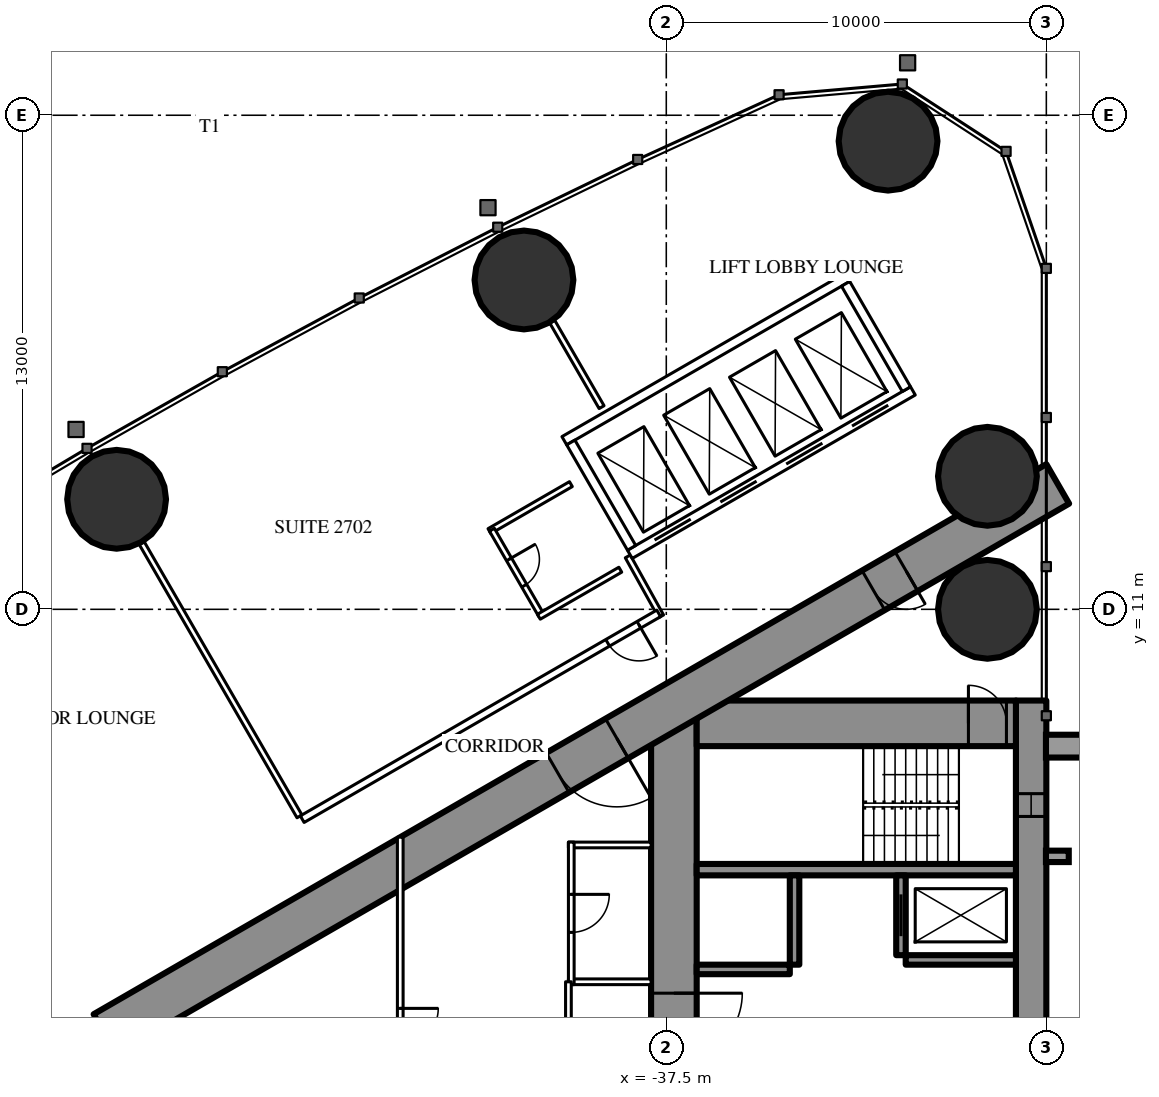
"""IFC4 building model, lengths in metres.
Left out: names, types, materials, properties, quantities, classifications, styles, units other than length and angle.
Written with IfcOpenShell. Run it as: python <this file> out.ifc"""

import sys

from ifc_helpers import new_model, si_unit, direction, frame, frame_2d, origin, origin_2d, place, context, subcontext, project, spatial, rectangle, hollow_circle, extrude, element, fill, save


model = new_model("IFC4")
c1 = context("Model", 3, precision=1e-05, world=origin(), true_north=direction((0.0, 1.0)))
c2 = subcontext(c1, "Body", "Model", "MODEL_VIEW")
j1 = project(units=[si_unit("LENGTHUNIT", "METRE"), si_unit("PLANEANGLEUNIT", "RADIAN")], contexts=[c1])
p1 = place(None, origin())
s1 = spatial("IfcSite", under=j1, at=p1, CompositionType="ELEMENT")
p2 = place(p1, origin())
s2 = spatial("IfcBuilding", under=s1, at=p2, CompositionType="ELEMENT")
p3 = place(p2, frame((0.0, 0.0, 104.6)))
s3 = spatial("IfcBuildingStorey", under=s2, at=p3, CompositionType="ELEMENT", Elevation=104.6)
for number, where, z_axis, x_axis in (
    (1, (-31.665, 23.318, 0.0), (0.0, 0.0, 1.0), (1.0, 0.0, 0.0)),
    (2, (-29.05, 11.0, 0.0), (0.0, 0.0, 1.0), (1.0, 0.0, 0.0)),
    (3, (-29.05, 14.5, 0.0), (0.0, 0.0, 1.0), (1.0, 0.0, 0.0)),
    (4, (-41.245, 19.666, 0.0), (0.0, 0.0, 1.0), (1.0, 0.0, 0.0)),
    (5, (-51.963, 13.895, 0.0), (0.0, 0.0, 1.0), (1.0, 0.0, 0.0)),
):
    element("IfcColumn", number, at=place(p3, frame(where, z_axis=z_axis, x_axis=x_axis)), inside=s3, PredefinedType="COLUMN", context=c2, shape_type="SweptSolid", body=[
        extrude(hollow_circle(Radius=1.3, WallThickness=0.1, at=origin_2d()), origin(), (0.0, 0.0, 1.0), 3.5),
    ])
p4 = place(p3, frame((-27.9, 8.6, 0.0), z_axis=(0.0, 0.0, 1.0), x_axis=(0.0, -1.0, 0.0)))
e6 = element("IfcWall", 6, at=p4, inside=s3, PredefinedType="SHEAR", context=c2, shape_type="SweptSolid", body=[
    extrude(rectangle(XDim=17.2, YDim=0.8, at=frame_2d((8.6, 0.0))), origin(), (0.0, 0.0, 1.0), 3.5),
])
p5 = place(p4, frame((2.45, 0.0, 0.6)))
e7 = element("IfcOpeningElement", 7, at=p5, cuts=e6, PredefinedType="OPENING", context=c2, shape_type="SweptSolid", body=[
    extrude(rectangle(XDim=0.6, YDim=2.1, at=frame_2d((0.3, 1.05))), frame((0.0, 0.41, 0.0), z_axis=(0.0, -1.0, 0.0), x_axis=(1.0, 0.0, 0.0)), (0.0, 0.0, 1.0), 0.82),
])
p6 = place(p4, frame((14.15, 0.0, 0.6)))
e8 = element("IfcOpeningElement", 8, at=p6, cuts=e6, PredefinedType="OPENING", context=c2, shape_type="SweptSolid", body=[
    extrude(rectangle(XDim=0.6, YDim=2.1, at=frame_2d((0.3, 1.05))), frame((0.0, 0.41, 0.0), z_axis=(0.0, -1.0, 0.0), x_axis=(1.0, 0.0, 0.0)), (0.0, 0.0, 1.0), 0.82),
])
p7 = place(p3, frame((-37.3, 8.6, 0.0), z_axis=(0.0, 0.0, 1.0), x_axis=(0.0, -1.0, 0.0)))
e9 = element("IfcWall", 9, at=p7, inside=s3, PredefinedType="SHEAR", context=c2, shape_type="SweptSolid", body=[
    extrude(rectangle(XDim=17.2, YDim=1.2, at=frame_2d((8.6, 0.0))), origin(), (0.0, 0.0, 1.0), 3.5),
])
p8 = place(p7, frame((7.7, 0.0, 0.0)))
e10 = element("IfcOpeningElement", 10, at=p8, cuts=e9, PredefinedType="OPENING", context=c2, shape_type="SweptSolid", body=[
    extrude(rectangle(XDim=1.8, YDim=2.2, at=frame_2d((0.9, 1.1))), frame((0.0, 0.61, 0.0), z_axis=(0.0, -1.0, 0.0), x_axis=(1.0, 0.0, 0.0)), (0.0, 0.0, 1.0), 1.22),
])
p9 = place(p3, frame((-28.3, 8.0, 0.0), z_axis=(0.0, 0.0, 1.0), x_axis=(-1.0, 0.0, 0.0)))
e11 = element("IfcWall", 11, at=p9, inside=s3, PredefinedType="SHEAR", context=c2, shape_type="SweptSolid", body=[
    extrude(rectangle(XDim=8.4, YDim=1.2, at=frame_2d((4.2, 0.0))), origin(), (0.0, 0.0, 1.0), 3.5),
])
p10 = place(p9, frame((0.25, 0.0, 0.0)))
e12 = element("IfcOpeningElement", 12, at=p10, cuts=e11, PredefinedType="OPENING", context=c2, shape_type="SweptSolid", body=[
    extrude(rectangle(XDim=1.0, YDim=2.2, at=frame_2d((0.5, 1.1))), frame((0.0, 0.61, 0.0), z_axis=(0.0, -1.0, 0.0), x_axis=(1.0, 0.0, 0.0)), (0.0, 0.0, 1.0), 1.22),
])
p11 = place(p3, frame((-28.3, 4.15, 0.0), z_axis=(0.0, 0.0, 1.0), x_axis=(-1.0, 0.0, 0.0)))
e13 = element("IfcWall", 13, at=p11, inside=s3, PredefinedType="SHEAR", context=c2, shape_type="SweptSolid", body=[
    extrude(rectangle(XDim=8.4, YDim=0.3, at=frame_2d((4.2, 0.0))), origin(), (0.0, 0.0, 1.0), 3.5),
])
p12 = place(p3, frame((-31.325, 4.0, 0.0), z_axis=(0.0, 0.0, 1.0), x_axis=(0.0, -1.0, 0.0)))
e14 = element("IfcWall", 14, at=p12, inside=s3, PredefinedType="SHEAR", context=c2, shape_type="SweptSolid", body=[
    extrude(rectangle(XDim=2.1, YDim=0.25, at=frame_2d((1.05, 0.0))), origin(), (0.0, 0.0, 1.0), 3.5),
])
p13 = place(p12, frame((0.5, 0.0, 0.0)))
e15 = element("IfcOpeningElement", 15, at=p13, cuts=e14, PredefinedType="OPENING", context=c2, shape_type="SweptSolid", body=[
    extrude(rectangle(XDim=1.1, YDim=2.2, at=frame_2d((0.55, 1.1))), frame((0.0, 0.135, 0.0), z_axis=(0.0, -1.0, 0.0), x_axis=(1.0, 0.0, 0.0)), (0.0, 0.0, 1.0), 0.27),
])
p14 = place(p3, frame((-34.125, 4.0, 0.0), z_axis=(0.0, 0.0, 1.0), x_axis=(0.0, -1.0, 0.0)))
e16 = element("IfcWall", 16, at=p14, inside=s3, PredefinedType="SHEAR", context=c2, shape_type="SweptSolid", body=[
    extrude(rectangle(XDim=2.35, YDim=0.25, at=frame_2d((1.175, 0.0))), origin(), (0.0, 0.0, 1.0), 3.5),
])
p15 = place(p3, frame((-28.3, 1.775, 0.0), z_axis=(0.0, 0.0, 1.0), x_axis=(-1.0, 0.0, 0.0)))
e17 = element("IfcWall", 17, at=p15, inside=s3, PredefinedType="SHEAR", context=c2, shape_type="SweptSolid", body=[
    extrude(rectangle(XDim=2.9, YDim=0.25, at=frame_2d((1.45, 0.0))), origin(), (0.0, 0.0, 1.0), 3.5),
])
p16 = place(p3, frame((-34.25, 1.525, 0.0), z_axis=(0.0, 0.0, 1.0), x_axis=(-1.0, 0.0, 0.0)))
e18 = element("IfcWall", 18, at=p16, inside=s3, PredefinedType="SHEAR", context=c2, shape_type="SweptSolid", body=[
    extrude(rectangle(XDim=2.45, YDim=0.25, at=frame_2d((1.225, 0.0))), origin(), (0.0, 0.0, 1.0), 3.5),
])
p17 = place(p3, frame((-27.2, 14.3, 0.0), z_axis=(0.0, 0.0, 1.0), x_axis=(-0.866026593062, -0.499997940104, 0.0)))
e19 = element("IfcWall", 19, at=p17, inside=s3, PredefinedType="SHEAR", context=c2, shape_type="SweptSolid", body=[
    extrude(rectangle(XDim=28.946, YDim=1.2, at=frame_2d((14.473, 0.0))), origin(), (0.0, 0.0, 1.0), 3.5),
])
p18 = place(p17, frame((4.6, 0.0, 0.0)))
e20 = element("IfcOpeningElement", 20, at=p18, cuts=e19, PredefinedType="OPENING", context=c2, shape_type="SweptSolid", body=[
    extrude(rectangle(XDim=1.0, YDim=2.2, at=frame_2d((0.5, 1.1))), frame((0.0, 0.61, 0.0), z_axis=(0.0, -1.0, 0.0), x_axis=(1.0, 0.0, 0.0)), (0.0, 0.0, 1.0), 1.22),
])
p19 = place(p17, frame((13.395, 0.0, 0.0)))
e21 = element("IfcOpeningElement", 21, at=p19, cuts=e19, PredefinedType="OPENING", context=c2, shape_type="SweptSolid", body=[
    extrude(rectangle(XDim=1.8, YDim=2.2, at=frame_2d((0.9, 1.1))), frame((0.0, 0.61, 0.0), z_axis=(0.0, -1.0, 0.0), x_axis=(1.0, 0.0, 0.0)), (0.0, 0.0, 1.0), 1.22),
])
p20 = place(p3, frame((-47.151, 5.552, 0.0), z_axis=(0.0, 0.0, 1.0), x_axis=(-0.500003012045, 0.866023664773, 0.0)))
e22 = element("IfcWall", 22, at=p20, inside=s3, PredefinedType="PARTITIONING", context=c2, shape_type="SweptSolid", body=[
    extrude(rectangle(XDim=8.311, YDim=0.15, at=frame_2d((4.156, 0.0))), origin(), (0.0, 0.0, 1.0), 2.2),
])
p21 = place(p3, frame((-39.202, 16.32, 0.0), z_axis=(0.0, 0.0, 1.0), x_axis=(-0.499947391036, 0.866055775454, 0.0)))
e23 = element("IfcWall", 23, at=p21, inside=s3, PredefinedType="PARTITIONING", context=c2, shape_type="SweptSolid", body=[
    extrude(rectangle(XDim=2.599, YDim=0.15, at=frame_2d((1.3, 0.0))), origin(), (0.0, 0.0, 1.0), 3.25),
])
p22 = place(p3, frame((-38.513, 12.392, 0.0), z_axis=(0.0, 0.0, 1.0), x_axis=(0.485585508183, -0.874189175317, 0.0)))
e24 = element("IfcWall", 24, at=p22, inside=s3, PredefinedType="PARTITIONING", context=c2, shape_type="SweptSolid", body=[
    extrude(rectangle(XDim=1.805, YDim=0.15, at=frame_2d((0.902, 0.0))), origin(), (0.0, 0.0, 1.0), 3.25),
])
p23 = place(p3, frame((-37.7, 10.894, 0.0), z_axis=(0.0, 0.0, 1.0), x_axis=(-0.866027551079, -0.499996280759, 0.0)))
e25 = element("IfcWall", 25, at=p23, inside=s3, PredefinedType="PARTITIONING", context=c2, shape_type="SweptSolid", body=[
    extrude(rectangle(XDim=10.831, YDim=0.2, at=frame_2d((5.415, 0.0))), origin(), (0.0, 0.0, 1.0), 3.25),
])
p24 = place(p23, frame((0.6, 0.0, 0.0)))
e26 = element("IfcOpeningElement", 26, at=p24, cuts=e25, PredefinedType="OPENING", context=c2, shape_type="SweptSolid", body=[
    extrude(rectangle(XDim=0.95, YDim=2.2, at=frame_2d((0.475, 1.1))), frame((0.0, 0.11, 0.0), z_axis=(0.0, -1.0, 0.0), x_axis=(1.0, 0.0, 0.0)), (0.0, 0.0, 1.0), 0.22),
])
p25 = place(p3, frame((-40.01, 14.294, 0.0), z_axis=(0.0, 0.0, 1.0), x_axis=(-0.866031185235, -0.4999899861, 0.0)))
e27 = element("IfcWall", 27, at=p25, inside=s3, PredefinedType="PARTITIONING", context=c2, shape_type="SweptSolid", body=[
    extrude(rectangle(XDim=2.475, YDim=0.15, at=frame_2d((1.238, 0.0))), origin(), (0.0, 0.0, 1.0), 3.25),
])
p26 = place(p3, frame((-40.788, 10.843, 0.0), z_axis=(0.0, 0.0, 1.0), x_axis=(-0.500006934395, 0.866021400173, 0.0)))
e28 = element("IfcWall", 28, at=p26, inside=s3, PredefinedType="PARTITIONING", context=c2, shape_type="SweptSolid", body=[
    extrude(rectangle(XDim=2.6, YDim=0.15, at=frame_2d((1.3, 0.0))), origin(), (0.0, 0.0, 1.0), 3.25),
])
p27 = place(p26, frame((0.9, 0.0, 0.0)))
e29 = element("IfcOpeningElement", 29, at=p27, cuts=e28, PredefinedType="OPENING", context=c2, shape_type="SweptSolid", body=[
    extrude(rectangle(XDim=0.8, YDim=2.2, at=frame_2d((0.4, 1.1))), frame((0.0, 0.085, 0.0), z_axis=(0.0, -1.0, 0.0), x_axis=(1.0, 0.0, 0.0)), (0.0, 0.0, 1.0), 0.17),
])
p28 = place(p3, frame((-38.71, 12.042, 0.0), z_axis=(0.0, 0.0, 1.0), x_axis=(-0.86604923931, -0.499958713387, 0.0)))
e30 = element("IfcWall", 30, at=p28, inside=s3, PredefinedType="PARTITIONING", context=c2, shape_type="SweptSolid", body=[
    extrude(rectangle(XDim=2.475, YDim=0.15, at=frame_2d((1.237, 0.0))), origin(), (0.0, 0.0, 1.0), 3.25),
])
for number, where, z_axis, x_axis in (
    (31, (-37.9, 1.2, 0.0), (0.0, 0.0, 1.0), (-1.0, 0.0, 0.0)),
    (32, (-37.9, 4.8, 0.0), (0.0, 0.0, 1.0), (-1.0, 0.0, 0.0)),
):
    element("IfcWall", number, at=place(p3, frame(where, z_axis=z_axis, x_axis=x_axis)), inside=s3, PredefinedType="PARTITIONING", context=c2, shape_type="SweptSolid", body=[
        extrude(rectangle(XDim=2.175, YDim=0.15, at=frame_2d((1.087, 0.0))), origin(), (0.0, 0.0, 1.0), 3.25),
    ])
p29 = place(p3, frame((-40.0, 4.875, 0.0), z_axis=(0.0, 0.0, 1.0), x_axis=(0.0, -1.0, 0.0)))
e33 = element("IfcWall", 33, at=p29, inside=s3, PredefinedType="PARTITIONING", context=c2, shape_type="SweptSolid", body=[
    extrude(rectangle(XDim=3.75, YDim=0.15, at=frame_2d((1.875, 0.0))), origin(), (0.0, 0.0, 1.0), 3.25),
])
p30 = place(p29, frame((1.375, 0.0, 0.0)))
e34 = element("IfcOpeningElement", 34, at=p30, cuts=e33, PredefinedType="OPENING", context=c2, shape_type="SweptSolid", body=[
    extrude(rectangle(XDim=1.0, YDim=2.2, at=frame_2d((0.5, 1.1))), frame((0.0, 0.085, 0.0), z_axis=(0.0, -1.0, 0.0), x_axis=(1.0, 0.0, 0.0)), (0.0, 0.0, 1.0), 0.17),
])
p31 = place(p3, frame((-40.075, 1.2, 0.0), z_axis=(0.0, 0.0, 1.0), x_axis=(0.0, -1.0, 0.0)))
e35 = element("IfcWall", 35, at=p31, inside=s3, PredefinedType="PARTITIONING", context=c2, shape_type="SweptSolid", body=[
    extrude(rectangle(XDim=7.374, YDim=0.15, at=frame_2d((3.687, 0.0))), origin(), (0.0, 0.0, 1.0), 3.25),
])
p32 = place(p31, frame((2.787, 0.0, 0.0)))
e36 = element("IfcOpeningElement", 36, at=p32, cuts=e35, PredefinedType="OPENING", context=c2, shape_type="SweptSolid", body=[
    extrude(rectangle(XDim=1.8, YDim=2.2, at=frame_2d((0.9, 1.1))), frame((0.0, 0.085, 0.0), z_axis=(0.0, -1.0, 0.0), x_axis=(1.0, 0.0, 0.0)), (0.0, 0.0, 1.0), 0.17),
])
p33 = place(p3, frame((-44.5, 5.005, 0.0), z_axis=(0.0, 0.0, 1.0), x_axis=(0.0, -1.0, 0.0)))
e37 = element("IfcWall", 37, at=p33, inside=s3, PredefinedType="PARTITIONING", context=c2, shape_type="SweptSolid", body=[
    extrude(rectangle(XDim=10.009, YDim=0.15, at=frame_2d((5.005, 0.0))), origin(), (0.0, 0.0, 1.0), 2.45),
])
p34 = place(p33, frame((4.505, 0.0, 0.0)))
e38 = element("IfcOpeningElement", 38, at=p34, cuts=e37, PredefinedType="OPENING", context=c2, shape_type="SweptSolid", body=[
    extrude(rectangle(XDim=1.0, YDim=2.2, at=frame_2d((0.5, 1.1))), frame((0.0, 0.085, 0.0), z_axis=(0.0, -1.0, 0.0), x_axis=(1.0, 0.0, 0.0)), (0.0, 0.0, 1.0), 0.17),
])
p35 = place(p3, frame((-31.01, 16.747, 0.0), z_axis=(0.0, 0.0, 1.0), x_axis=(-0.866028165386, -0.499995216735, 0.0)))
e39 = element("IfcWall", 39, at=p35, inside=s3, PredefinedType="PARTITIONING", context=c2, shape_type="SweptSolid", body=[
    extrude(rectangle(XDim=8.6, YDim=0.25, at=frame_2d((4.3, 0.0))), origin(), (0.0, 0.0, 1.0), 3.25),
])
p36 = place(p35, frame((0.75, 0.0, 0.0)))
e40 = element("IfcOpeningElement", 40, at=p36, cuts=e39, PredefinedType="OPENING", context=c2, shape_type="SweptSolid", body=[
    extrude(rectangle(XDim=1.1, YDim=2.2, at=frame_2d((0.55, 1.1))), frame((0.0, 0.135, 0.0), z_axis=(0.0, -1.0, 0.0), x_axis=(1.0, 0.0, 0.0)), (0.0, 0.0, 1.0), 0.27),
])
p37 = place(p35, frame((2.75, 0.0, 0.0)))
e41 = element("IfcOpeningElement", 41, at=p37, cuts=e39, PredefinedType="OPENING", context=c2, shape_type="SweptSolid", body=[
    extrude(rectangle(XDim=1.1, YDim=2.2, at=frame_2d((0.55, 1.1))), frame((0.0, 0.135, 0.0), z_axis=(0.0, -1.0, 0.0), x_axis=(1.0, 0.0, 0.0)), (0.0, 0.0, 1.0), 0.27),
])
p38 = place(p35, frame((4.75, 0.0, 0.0)))
e42 = element("IfcOpeningElement", 42, at=p38, cuts=e39, PredefinedType="OPENING", context=c2, shape_type="SweptSolid", body=[
    extrude(rectangle(XDim=1.1, YDim=2.2, at=frame_2d((0.55, 1.1))), frame((0.0, 0.135, 0.0), z_axis=(0.0, -1.0, 0.0), x_axis=(1.0, 0.0, 0.0)), (0.0, 0.0, 1.0), 0.27),
])
p39 = place(p35, frame((6.75, 0.0, 0.0)))
e43 = element("IfcOpeningElement", 43, at=p39, cuts=e39, PredefinedType="OPENING", context=c2, shape_type="SweptSolid", body=[
    extrude(rectangle(XDim=1.1, YDim=2.2, at=frame_2d((0.55, 1.1))), frame((0.0, 0.135, 0.0), z_axis=(0.0, -1.0, 0.0), x_axis=(1.0, 0.0, 0.0)), (0.0, 0.0, 1.0), 0.27),
])
p40 = place(p3, frame((-32.736, 19.736, 0.0), z_axis=(0.0, 0.0, 1.0), x_axis=(-0.866028165386, -0.499995216735, 0.0)))
e44 = element("IfcWall", 44, at=p40, inside=s3, PredefinedType="PARTITIONING", context=c2, shape_type="SweptSolid", body=[
    extrude(rectangle(XDim=8.6, YDim=0.25, at=frame_2d((4.3, 0.0))), origin(), (0.0, 0.0, 1.0), 3.25),
])
p41 = place(p3, frame((-31.181, 16.793, 0.0), z_axis=(0.0, 0.0, 1.0), x_axis=(-0.499929347863, 0.866066190972, 0.0)))
e45 = element("IfcWall", 45, at=p41, inside=s3, PredefinedType="PARTITIONING", context=c2, shape_type="SweptSolid", body=[
    extrude(rectangle(XDim=3.201, YDim=0.25, at=frame_2d((1.6, 0.0))), origin(), (0.0, 0.0, 1.0), 3.25),
])
p42 = place(p3, frame((-38.413, 12.618, 0.0), z_axis=(0.0, 0.0, 1.0), x_axis=(-0.499872130319, 0.866099216793, 0.0)))
e46 = element("IfcWall", 46, at=p42, inside=s3, PredefinedType="PARTITIONING", context=c2, shape_type="SweptSolid", body=[
    extrude(rectangle(XDim=3.2, YDim=0.25, at=frame_2d((1.6, 0.0))), origin(), (0.0, 0.0, 1.0), 3.25),
])
p43 = place(p27, origin())
e47 = element("IfcDoor", 47, at=p43, inside=s3, OperationType="SINGLE_SWING_RIGHT", PredefinedType="DOOR", context=c2, shape_type="SweptSolid", body=[
    extrude(rectangle(XDim=0.8, YDim=2.2, at=frame_2d((0.4, 1.1))), frame((0.0, 0.025, 0.0), z_axis=(0.0, -1.0, 0.0), x_axis=(1.0, 0.0, 0.0)), (0.0, 0.0, 1.0), 0.05),
])
fill(e29, e47)
p44 = place(p24, origin())
e48 = element("IfcDoor", 48, at=p44, inside=s3, OperationType="SINGLE_SWING_LEFT", PredefinedType="DOOR", context=c2, shape_type="SweptSolid", body=[
    extrude(rectangle(XDim=0.95, YDim=2.2, at=frame_2d((0.475, 1.1))), frame((0.0, 0.025, 0.0), z_axis=(0.0, -1.0, 0.0), x_axis=(1.0, 0.0, 0.0)), (0.0, 0.0, 1.0), 0.05),
])
fill(e26, e48)
p45 = place(p30, origin())
e49 = element("IfcDoor", 49, at=p45, inside=s3, OperationType="SINGLE_SWING_LEFT", PredefinedType="DOOR", context=c2, shape_type="SweptSolid", body=[
    extrude(rectangle(XDim=1.0, YDim=2.2, at=frame_2d((0.5, 1.1))), frame((0.0, 0.025, 0.0), z_axis=(0.0, -1.0, 0.0), x_axis=(1.0, 0.0, 0.0)), (0.0, 0.0, 1.0), 0.05),
])
fill(e34, e49)
p46 = place(p34, origin())
e50 = element("IfcDoor", 50, at=p46, inside=s3, OperationType="SINGLE_SWING_LEFT", PredefinedType="DOOR", context=c2, shape_type="SweptSolid", body=[
    extrude(rectangle(XDim=1.0, YDim=2.2, at=frame_2d((0.5, 1.1))), frame((0.0, 0.025, 0.0), z_axis=(0.0, -1.0, 0.0), x_axis=(1.0, 0.0, 0.0)), (0.0, 0.0, 1.0), 0.05),
])
fill(e38, e50)
p47 = place(p18, origin())
e51 = element("IfcDoor", 51, at=p47, inside=s3, OperationType="SINGLE_SWING_LEFT", PredefinedType="DOOR", context=c2, shape_type="SweptSolid", body=[
    extrude(rectangle(XDim=1.0, YDim=2.2, at=frame_2d((0.5, 1.1))), frame((0.0, 0.025, 0.0), z_axis=(0.0, -1.0, 0.0), x_axis=(1.0, 0.0, 0.0)), (0.0, 0.0, 1.0), 0.05),
])
fill(e20, e51)
p48 = place(p19, origin())
e52 = element("IfcDoor", 52, at=p48, inside=s3, OperationType="DOUBLE_DOOR_SINGLE_SWING", PredefinedType="DOOR", context=c2, shape_type="SweptSolid", body=[
    extrude(rectangle(XDim=1.8, YDim=2.2, at=frame_2d((0.9, 1.1))), frame((0.0, 0.025, 0.0), z_axis=(0.0, -1.0, 0.0), x_axis=(1.0, 0.0, 0.0)), (0.0, 0.0, 1.0), 0.05),
])
fill(e21, e52)
p49 = place(p8, origin())
e53 = element("IfcDoor", 53, at=p49, inside=s3, OperationType="DOUBLE_DOOR_SINGLE_SWING", PredefinedType="DOOR", context=c2, shape_type="SweptSolid", body=[
    extrude(rectangle(XDim=1.8, YDim=2.2, at=frame_2d((0.9, 1.1))), frame((0.0, 0.025, 0.0), z_axis=(0.0, -1.0, 0.0), x_axis=(1.0, 0.0, 0.0)), (0.0, 0.0, 1.0), 0.05),
])
fill(e10, e53)
p50 = place(p10, origin())
e54 = element("IfcDoor", 54, at=p50, inside=s3, OperationType="SINGLE_SWING_RIGHT", PredefinedType="DOOR", context=c2, shape_type="SweptSolid", body=[
    extrude(rectangle(XDim=1.0, YDim=2.2, at=frame_2d((0.5, 1.1))), frame((0.0, 0.025, 0.0), z_axis=(0.0, -1.0, 0.0), x_axis=(1.0, 0.0, 0.0)), (0.0, 0.0, 1.0), 0.05),
])
fill(e12, e54)
p51 = place(p13, origin())
e55 = element("IfcDoor", 55, at=p51, inside=s3, OperationType="SLIDING_TO_LEFT", PredefinedType="USERDEFINED", context=c2, shape_type="SweptSolid", body=[
    extrude(rectangle(XDim=1.1, YDim=2.2, at=frame_2d((0.55, 1.1))), frame((0.0, 0.025, 0.0), z_axis=(0.0, -1.0, 0.0), x_axis=(1.0, 0.0, 0.0)), (0.0, 0.0, 1.0), 0.05),
])
fill(e15, e55)
p52 = place(p36, origin())
e56 = element("IfcDoor", 56, at=p52, inside=s3, OperationType="DOUBLE_DOOR_SLIDING", PredefinedType="USERDEFINED", context=c2, shape_type="SweptSolid", body=[
    extrude(rectangle(XDim=1.1, YDim=2.2, at=frame_2d((0.55, 1.1))), frame((0.0, 0.025, 0.0), z_axis=(0.0, -1.0, 0.0), x_axis=(1.0, 0.0, 0.0)), (0.0, 0.0, 1.0), 0.05),
])
fill(e40, e56)
p53 = place(p37, origin())
e57 = element("IfcDoor", 57, at=p53, inside=s3, OperationType="DOUBLE_DOOR_SLIDING", PredefinedType="USERDEFINED", context=c2, shape_type="SweptSolid", body=[
    extrude(rectangle(XDim=1.1, YDim=2.2, at=frame_2d((0.55, 1.1))), frame((0.0, 0.025, 0.0), z_axis=(0.0, -1.0, 0.0), x_axis=(1.0, 0.0, 0.0)), (0.0, 0.0, 1.0), 0.05),
])
fill(e41, e57)
p54 = place(p38, origin())
e58 = element("IfcDoor", 58, at=p54, inside=s3, OperationType="DOUBLE_DOOR_SLIDING", PredefinedType="USERDEFINED", context=c2, shape_type="SweptSolid", body=[
    extrude(rectangle(XDim=1.1, YDim=2.2, at=frame_2d((0.55, 1.1))), frame((0.0, 0.025, 0.0), z_axis=(0.0, -1.0, 0.0), x_axis=(1.0, 0.0, 0.0)), (0.0, 0.0, 1.0), 0.05),
])
fill(e42, e58)
p55 = place(p39, origin())
e59 = element("IfcDoor", 59, at=p55, inside=s3, OperationType="DOUBLE_DOOR_SLIDING", PredefinedType="USERDEFINED", context=c2, shape_type="SweptSolid", body=[
    extrude(rectangle(XDim=1.1, YDim=2.2, at=frame_2d((0.55, 1.1))), frame((0.0, 0.025, 0.0), z_axis=(0.0, -1.0, 0.0), x_axis=(1.0, 0.0, 0.0)), (0.0, 0.0, 1.0), 0.05),
])
fill(e43, e59)
p56 = place(p5, origin())
e60 = element("IfcWindow", 60, at=p56, inside=s3, PartitioningType="SINGLE_PANEL", PredefinedType="WINDOW", context=c2, shape_type="SweptSolid", body=[
    extrude(rectangle(XDim=0.6, YDim=2.1, at=frame_2d((0.3, 1.05))), frame((0.0, 0.03, 0.0), z_axis=(0.0, -1.0, 0.0), x_axis=(1.0, 0.0, 0.0)), (0.0, 0.0, 1.0), 0.06),
])
fill(e7, e60)
save(model, sys.argv[1])
